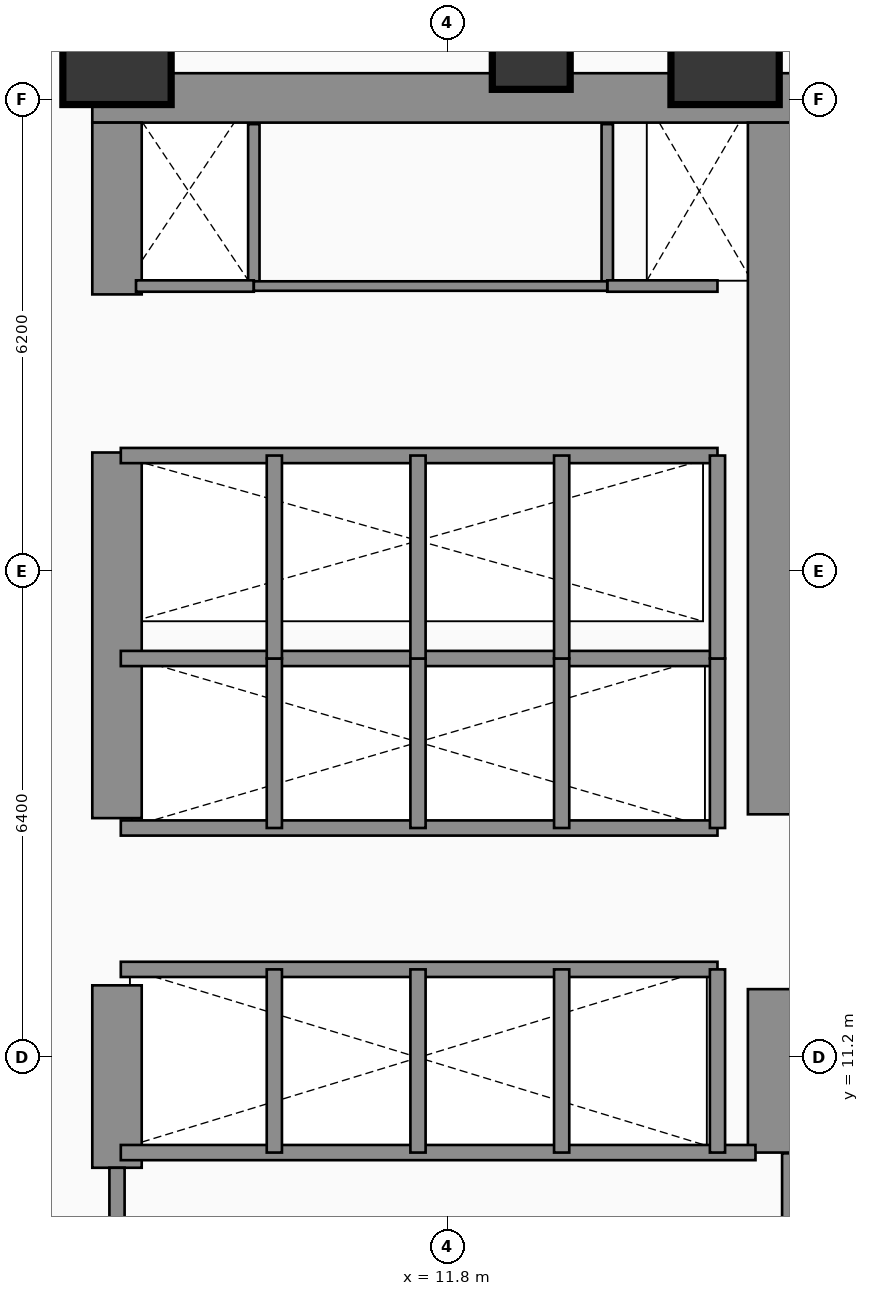
"""IFC4 building model, lengths in metres.
Left out: names, types, materials, properties, quantities, classifications, styles, units other than length and angle.
Written with IfcOpenShell. Run it as: python <this file> out.ifc"""

import sys

from ifc_helpers import new_model, si_unit, direction, frame, frame_2d, origin, origin_2d, place, context, subcontext, project, spatial, rectangle, extrude, element, fill, save


model = new_model("IFC4")
c1 = context("Model", 3, precision=1e-05, world=origin(), true_north=direction((0.0, 1.0)))
c2 = subcontext(c1, "Body", "Model", "MODEL_VIEW")
j1 = project(units=[si_unit("LENGTHUNIT", "METRE"), si_unit("PLANEANGLEUNIT", "RADIAN")], contexts=[c1])
p1 = place(None, origin())
s1 = spatial("IfcSite", under=j1, at=p1, CompositionType="ELEMENT")
p2 = place(p1, origin())
s2 = spatial("IfcBuilding", under=s1, at=p2, CompositionType="ELEMENT")
p3 = place(p2, frame((0.0, 0.0, 110.7)))
s3 = spatial("IfcBuildingStorey", under=s2, at=p3, CompositionType="ELEMENT", Elevation=110.7)
p4 = place(p3, frame((7.125, 23.825, 0.0), z_axis=(0.0, 0.0, 1.0), x_axis=(1.0, 0.0, 0.0)))
e1 = element("IfcWall", 1, at=p4, inside=s3, PredefinedType="SHEAR", context=c2, shape_type="SweptSolid", body=[
    extrude(rectangle(XDim=14.0, YDim=0.65, at=frame_2d((7.0, 0.0))), origin(), (0.0, 0.0, 1.0), 3.54),
])
p5 = place(p3, frame((7.45, 9.75, 0.0), z_axis=(0.0, 0.0, 1.0), x_axis=(0.0, 1.0, 0.0)))
e2 = element("IfcWall", 2, at=p5, inside=s3, PredefinedType="SHEAR", context=c2, shape_type="SweptSolid", body=[
    extrude(rectangle(XDim=2.4, YDim=0.65, at=frame_2d((1.2, 0.0))), origin(), (0.0, 0.0, 1.0), 3.54),
])
p6 = place(p3, frame((7.45, 14.35, 0.0), z_axis=(0.0, 0.0, 1.0), x_axis=(0.0, 1.0, 0.0)))
e3 = element("IfcWall", 3, at=p6, inside=s3, PredefinedType="SHEAR", context=c2, shape_type="SweptSolid", body=[
    extrude(rectangle(XDim=4.81, YDim=0.65, at=frame_2d((2.405, 0.0))), origin(), (0.0, 0.0, 1.0), 3.54),
])
p7 = place(p3, frame((7.45, 21.24, 0.0), z_axis=(0.0, 0.0, 1.0), x_axis=(0.0, 1.0, 0.0)))
e4 = element("IfcWall", 4, at=p7, inside=s3, PredefinedType="SHEAR", context=c2, shape_type="SweptSolid", body=[
    extrude(rectangle(XDim=2.26, YDim=0.65, at=frame_2d((1.13, 0.0))), origin(), (0.0, 0.0, 1.0), 3.54),
])
p8 = place(p3, frame((16.075, 9.95, 0.0), z_axis=(0.0, 0.0, 1.0), x_axis=(0.0, 1.0, 0.0)))
e5 = element("IfcWall", 5, at=p8, inside=s3, PredefinedType="SHEAR", context=c2, shape_type="SweptSolid", body=[
    extrude(rectangle(XDim=2.15, YDim=0.65, at=frame_2d((1.075, 0.0))), origin(), (0.0, 0.0, 1.0), 3.54),
])
p9 = place(p3, frame((16.075, 14.4, 0.0), z_axis=(0.0, 0.0, 1.0), x_axis=(0.0, 1.0, 0.0)))
e6 = element("IfcWall", 6, at=p9, inside=s3, PredefinedType="SHEAR", context=c2, shape_type="SweptSolid", body=[
    extrude(rectangle(XDim=9.1, YDim=0.65, at=frame_2d((4.55, 0.0))), origin(), (0.0, 0.0, 1.0), 3.54),
])
for number, where, z_axis, x_axis in (
    (7, (7.45, 24.45, 0.0), (0.0, 0.0, 1.0), (1.0, 0.0, 0.0)),
    (8, (15.45, 24.45, 0.0), (0.0, 0.0, 1.0), (1.0, 0.0, 0.0)),
):
    element("IfcColumn", number, at=place(p3, frame(where, z_axis=z_axis, x_axis=x_axis)), inside=s3, PredefinedType="COLUMN", context=c2, shape_type="SweptSolid", body=[
        extrude(rectangle(XDim=1.4, YDim=1.4, at=origin_2d()), origin(), (0.0, 0.0, 1.0), 3.54),
    ])
p10 = place(p3, frame((12.9, 24.45, 0.0), z_axis=(0.0, 0.0, 1.0), x_axis=(1.0, 0.0, 0.0)))
e9 = element("IfcColumn", 9, at=p10, inside=s3, PredefinedType="COLUMN", context=c2, shape_type="SweptSolid", body=[
    extrude(rectangle(XDim=1.0, YDim=1.0, at=origin_2d()), origin(), (0.0, 0.0, 1.0), 3.54),
])
p11 = place(p3, frame((16.3, 7.36, 0.0), z_axis=(0.0, 0.0, 1.0), x_axis=(0.0, 1.0, 0.0)))
e10 = element("IfcWall", 10, at=p11, inside=s3, PredefinedType="SHEAR", context=c2, shape_type="SweptSolid", body=[
    extrude(rectangle(XDim=2.58, YDim=0.2, at=frame_2d((1.29, 0.0))), origin(), (0.0, 0.0, 1.0), 3.54),
])
p12 = place(p3, frame((7.5, 9.95, 0.0), z_axis=(0.0, 0.0, 1.0), x_axis=(1.0, 0.0, 0.0)))
e11 = element("IfcWall", 11, at=p12, inside=s3, PredefinedType="PARTITIONING", context=c2, shape_type="SweptSolid", body=[
    extrude(rectangle(XDim=8.35, YDim=0.2, at=frame_2d((4.175, 0.0))), origin(), (0.0, 0.0, 1.0), 3.54),
])
p13 = place(p3, frame((7.45, 7.45, 0.0), z_axis=(0.0, 0.0, 1.0), x_axis=(0.0, 1.0, 0.0)))
e12 = element("IfcWall", 12, at=p13, inside=s3, PredefinedType="PARTITIONING", context=c2, shape_type="SweptSolid", body=[
    extrude(rectangle(XDim=2.3, YDim=0.2, at=frame_2d((1.15, 0.0))), origin(), (0.0, 0.0, 1.0), 2.52),
])
p14 = place(p13, frame((0.633, 0.0, 0.0)))
e13 = element("IfcOpeningElement", 13, at=p14, cuts=e12, PredefinedType="OPENING", context=c2, shape_type="SweptSolid", body=[
    extrude(rectangle(XDim=1.2, YDim=2.25, at=frame_2d((0.6, 1.125))), frame((0.0, 0.11, 0.0), z_axis=(0.0, -1.0, 0.0), x_axis=(1.0, 0.0, 0.0)), (0.0, 0.0, 1.0), 0.22),
])
p15 = place(p3, frame((7.5, 12.36, 0.0), z_axis=(0.0, 0.0, 1.0), x_axis=(1.0, 0.0, 0.0)))
e14 = element("IfcWall", 14, at=p15, inside=s3, PredefinedType="PARTITIONING", context=c2, shape_type="SweptSolid", body=[
    extrude(rectangle(XDim=7.85, YDim=0.2, at=frame_2d((3.925, 0.0))), origin(), (0.0, 0.0, 1.0), 3.54),
])
p16 = place(p15, frame((0.53, 0.0, 0.0)))
e15 = element("IfcOpeningElement", 15, at=p16, cuts=e14, PredefinedType="OPENING", context=c2, shape_type="SweptSolid", body=[
    extrude(rectangle(XDim=1.1, YDim=2.2, at=frame_2d((0.55, 1.1))), frame((0.0, 0.11, 0.0), z_axis=(0.0, -1.0, 0.0), x_axis=(1.0, 0.0, 0.0)), (0.0, 0.0, 1.0), 0.22),
])
p17 = place(p15, frame((2.42, 0.0, 0.0)))
e16 = element("IfcOpeningElement", 16, at=p17, cuts=e14, PredefinedType="OPENING", context=c2, shape_type="SweptSolid", body=[
    extrude(rectangle(XDim=1.1, YDim=2.2, at=frame_2d((0.55, 1.1))), frame((0.0, 0.11, 0.0), z_axis=(0.0, -1.0, 0.0), x_axis=(1.0, 0.0, 0.0)), (0.0, 0.0, 1.0), 0.22),
])
p18 = place(p15, frame((4.31, 0.0, 0.0)))
e17 = element("IfcOpeningElement", 17, at=p18, cuts=e14, PredefinedType="OPENING", context=c2, shape_type="SweptSolid", body=[
    extrude(rectangle(XDim=1.1, YDim=2.2, at=frame_2d((0.55, 1.1))), frame((0.0, 0.11, 0.0), z_axis=(0.0, -1.0, 0.0), x_axis=(1.0, 0.0, 0.0)), (0.0, 0.0, 1.0), 0.22),
])
p19 = place(p15, frame((6.2, 0.0, 0.0)))
e18 = element("IfcOpeningElement", 18, at=p19, cuts=e14, PredefinedType="OPENING", context=c2, shape_type="SweptSolid", body=[
    extrude(rectangle(XDim=1.1, YDim=2.2, at=frame_2d((0.55, 1.1))), frame((0.0, 0.11, 0.0), z_axis=(0.0, -1.0, 0.0), x_axis=(1.0, 0.0, 0.0)), (0.0, 0.0, 1.0), 0.22),
])
for number, where, z_axis, x_axis in (
    (19, (15.35, 9.95, 0.0), (0.0, 0.0, 1.0), (0.0, 1.0, 0.0)),
    (20, (9.52, 9.95, 0.0), (0.0, 0.0, 1.0), (0.0, 1.0, 0.0)),
    (21, (11.41, 9.95, 0.0), (0.0, 0.0, 1.0), (0.0, 1.0, 0.0)),
    (22, (13.3, 9.95, 0.0), (0.0, 0.0, 1.0), (0.0, 1.0, 0.0)),
):
    element("IfcWall", number, at=place(p3, frame(where, z_axis=z_axis, x_axis=x_axis)), inside=s3, PredefinedType="PARTITIONING", context=c2, shape_type="SweptSolid", body=[
        extrude(rectangle(XDim=2.41, YDim=0.2, at=frame_2d((1.205, 0.0))), origin(), (0.0, 0.0, 1.0), 3.54),
    ])
p20 = place(p3, frame((7.5, 14.22, 0.0), z_axis=(0.0, 0.0, 1.0), x_axis=(1.0, 0.0, 0.0)))
e23 = element("IfcWall", 23, at=p20, inside=s3, PredefinedType="PARTITIONING", context=c2, shape_type="SweptSolid", body=[
    extrude(rectangle(XDim=7.85, YDim=0.2, at=frame_2d((3.925, 0.0))), origin(), (0.0, 0.0, 1.0), 3.54),
])
p21 = place(p20, frame((0.53, 0.0, 0.0)))
e24 = element("IfcOpeningElement", 24, at=p21, cuts=e23, PredefinedType="OPENING", context=c2, shape_type="SweptSolid", body=[
    extrude(rectangle(XDim=1.1, YDim=2.2, at=frame_2d((0.55, 1.1))), frame((0.0, 0.11, 0.0), z_axis=(0.0, -1.0, 0.0), x_axis=(1.0, 0.0, 0.0)), (0.0, 0.0, 1.0), 0.22),
])
p22 = place(p20, frame((2.42, 0.0, 0.0)))
e25 = element("IfcOpeningElement", 25, at=p22, cuts=e23, PredefinedType="OPENING", context=c2, shape_type="SweptSolid", body=[
    extrude(rectangle(XDim=1.1, YDim=2.2, at=frame_2d((0.55, 1.1))), frame((0.0, 0.11, 0.0), z_axis=(0.0, -1.0, 0.0), x_axis=(1.0, 0.0, 0.0)), (0.0, 0.0, 1.0), 0.22),
])
p23 = place(p20, frame((4.31, 0.0, 0.0)))
e26 = element("IfcOpeningElement", 26, at=p23, cuts=e23, PredefinedType="OPENING", context=c2, shape_type="SweptSolid", body=[
    extrude(rectangle(XDim=1.1, YDim=2.2, at=frame_2d((0.55, 1.1))), frame((0.0, 0.11, 0.0), z_axis=(0.0, -1.0, 0.0), x_axis=(1.0, 0.0, 0.0)), (0.0, 0.0, 1.0), 0.22),
])
p24 = place(p20, frame((6.2, 0.0, 0.0)))
e27 = element("IfcOpeningElement", 27, at=p24, cuts=e23, PredefinedType="OPENING", context=c2, shape_type="SweptSolid", body=[
    extrude(rectangle(XDim=1.1, YDim=2.2, at=frame_2d((0.55, 1.1))), frame((0.0, 0.11, 0.0), z_axis=(0.0, -1.0, 0.0), x_axis=(1.0, 0.0, 0.0)), (0.0, 0.0, 1.0), 0.22),
])
p25 = place(p3, frame((7.5, 16.45, 0.0), z_axis=(0.0, 0.0, 1.0), x_axis=(1.0, 0.0, 0.0)))
e28 = element("IfcWall", 28, at=p25, inside=s3, PredefinedType="PARTITIONING", context=c2, shape_type="SweptSolid", body=[
    extrude(rectangle(XDim=7.85, YDim=0.2, at=frame_2d((3.925, 0.0))), origin(), (0.0, 0.0, 1.0), 3.54),
])
for number, where, z_axis, x_axis in (
    (29, (15.35, 14.22, 0.0), (0.0, 0.0, 1.0), (0.0, 1.0, 0.0)),
    (30, (9.52, 14.22, 0.0), (0.0, 0.0, 1.0), (0.0, 1.0, 0.0)),
    (31, (11.41, 14.22, 0.0), (0.0, 0.0, 1.0), (0.0, 1.0, 0.0)),
    (32, (13.3, 14.22, 0.0), (0.0, 0.0, 1.0), (0.0, 1.0, 0.0)),
):
    element("IfcWall", number, at=place(p3, frame(where, z_axis=z_axis, x_axis=x_axis)), inside=s3, PredefinedType="PARTITIONING", context=c2, shape_type="SweptSolid", body=[
        extrude(rectangle(XDim=2.23, YDim=0.2, at=frame_2d((1.115, 0.0))), origin(), (0.0, 0.0, 1.0), 3.54),
    ])
p26 = place(p3, frame((7.5, 19.12, 0.0), z_axis=(0.0, 0.0, 1.0), x_axis=(1.0, 0.0, 0.0)))
e33 = element("IfcWall", 33, at=p26, inside=s3, PredefinedType="PARTITIONING", context=c2, shape_type="SweptSolid", body=[
    extrude(rectangle(XDim=7.85, YDim=0.2, at=frame_2d((3.925, 0.0))), origin(), (0.0, 0.0, 1.0), 3.54),
])
p27 = place(p26, frame((0.53, 0.0, 0.0)))
e34 = element("IfcOpeningElement", 34, at=p27, cuts=e33, PredefinedType="OPENING", context=c2, shape_type="SweptSolid", body=[
    extrude(rectangle(XDim=1.1, YDim=2.2, at=frame_2d((0.55, 1.1))), frame((0.0, 0.11, 0.0), z_axis=(0.0, -1.0, 0.0), x_axis=(1.0, 0.0, 0.0)), (0.0, 0.0, 1.0), 0.22),
])
p28 = place(p26, frame((2.42, 0.0, 0.0)))
e35 = element("IfcOpeningElement", 35, at=p28, cuts=e33, PredefinedType="OPENING", context=c2, shape_type="SweptSolid", body=[
    extrude(rectangle(XDim=1.1, YDim=2.2, at=frame_2d((0.55, 1.1))), frame((0.0, 0.11, 0.0), z_axis=(0.0, -1.0, 0.0), x_axis=(1.0, 0.0, 0.0)), (0.0, 0.0, 1.0), 0.22),
])
p29 = place(p26, frame((4.31, 0.0, 0.0)))
e36 = element("IfcOpeningElement", 36, at=p29, cuts=e33, PredefinedType="OPENING", context=c2, shape_type="SweptSolid", body=[
    extrude(rectangle(XDim=1.1, YDim=2.2, at=frame_2d((0.55, 1.1))), frame((0.0, 0.11, 0.0), z_axis=(0.0, -1.0, 0.0), x_axis=(1.0, 0.0, 0.0)), (0.0, 0.0, 1.0), 0.22),
])
p30 = place(p26, frame((6.2, 0.0, 0.0)))
e37 = element("IfcOpeningElement", 37, at=p30, cuts=e33, PredefinedType="OPENING", context=c2, shape_type="SweptSolid", body=[
    extrude(rectangle(XDim=1.1, YDim=2.2, at=frame_2d((0.55, 1.1))), frame((0.0, 0.11, 0.0), z_axis=(0.0, -1.0, 0.0), x_axis=(1.0, 0.0, 0.0)), (0.0, 0.0, 1.0), 0.22),
])
for number, where, z_axis, x_axis in (
    (38, (15.35, 16.45, 0.0), (0.0, 0.0, 1.0), (0.0, 1.0, 0.0)),
    (39, (9.52, 16.45, 0.0), (0.0, 0.0, 1.0), (0.0, 1.0, 0.0)),
    (40, (11.41, 16.45, 0.0), (0.0, 0.0, 1.0), (0.0, 1.0, 0.0)),
    (41, (13.3, 16.45, 0.0), (0.0, 0.0, 1.0), (0.0, 1.0, 0.0)),
):
    element("IfcWall", number, at=place(p3, frame(where, z_axis=z_axis, x_axis=x_axis)), inside=s3, PredefinedType="PARTITIONING", context=c2, shape_type="SweptSolid", body=[
        extrude(rectangle(XDim=2.67, YDim=0.2, at=frame_2d((1.335, 0.0))), origin(), (0.0, 0.0, 1.0), 3.54),
    ])
for number, where, z_axis, x_axis in (
    (42, (9.25, 21.35, 0.0), (0.0, 0.0, 1.0), (0.0, 1.0, 0.0)),
    (43, (13.9, 21.35, 0.0), (0.0, 0.0, 1.0), (0.0, 1.0, 0.0)),
):
    element("IfcWall", number, at=place(p3, frame(where, z_axis=z_axis, x_axis=x_axis)), inside=s3, PredefinedType="PARTITIONING", context=c2, shape_type="SweptSolid", body=[
        extrude(rectangle(XDim=2.13, YDim=0.15, at=frame_2d((1.065, 0.0))), origin(), (0.0, 0.0, 1.0), 3.54),
    ])
p31 = place(p3, frame((7.7, 21.35, 0.0), z_axis=(0.0, 0.0, 1.0), x_axis=(1.0, 0.0, 0.0)))
e44 = element("IfcWall", 44, at=p31, inside=s3, PredefinedType="PARTITIONING", context=c2, shape_type="SweptSolid", body=[
    extrude(rectangle(XDim=1.55, YDim=0.15, at=frame_2d((0.775, 0.0))), origin(), (0.0, 0.0, 1.0), 3.54),
])
p32 = place(p31, frame((0.39, 0.0, 0.0)))
e45 = element("IfcOpeningElement", 45, at=p32, cuts=e44, PredefinedType="OPENING", context=c2, shape_type="SweptSolid", body=[
    extrude(rectangle(XDim=0.85, YDim=2.15, at=frame_2d((0.425, 1.075))), frame((0.0, 0.085, 0.0), z_axis=(0.0, -1.0, 0.0), x_axis=(1.0, 0.0, 0.0)), (0.0, 0.0, 1.0), 0.17),
])
p33 = place(p3, frame((13.9, 21.35, 0.0), z_axis=(0.0, 0.0, 1.0), x_axis=(1.0, 0.0, 0.0)))
e46 = element("IfcWall", 46, at=p33, inside=s3, PredefinedType="PARTITIONING", context=c2, shape_type="SweptSolid", body=[
    extrude(rectangle(XDim=1.45, YDim=0.15, at=frame_2d((0.725, 0.0))), origin(), (0.0, 0.0, 1.0), 3.54),
])
p34 = place(p3, frame((9.25, 21.35, 0.0), z_axis=(0.0, 0.0, 1.0), x_axis=(1.0, 0.0, 0.0)))
e47 = element("IfcWall", 47, at=p34, inside=s3, PredefinedType="PARTITIONING", context=c2, shape_type="SweptSolid", body=[
    extrude(rectangle(XDim=4.65, YDim=0.125, at=frame_2d((2.325, 0.0))), origin(), (0.0, 0.0, 1.0), 3.54),
])
p35 = place(p34, frame((1.971, 0.0, 0.0)))
e48 = element("IfcOpeningElement", 48, at=p35, cuts=e47, PredefinedType="OPENING", context=c2, shape_type="SweptSolid", body=[
    extrude(rectangle(XDim=0.85, YDim=2.15, at=frame_2d((0.425, 1.075))), frame((0.0, 0.073, 0.0), z_axis=(0.0, -1.0, 0.0), x_axis=(1.0, 0.0, 0.0)), (0.0, 0.0, 1.0), 0.145),
])
p36 = place(p14, frame((1.2, 0.0, 0.0), z_axis=(0.0, 0.0, 1.0), x_axis=(-1.0, 0.0, 0.0)))
e49 = element("IfcDoor", 49, at=p36, inside=s3, OperationType="SINGLE_SWING_LEFT", PredefinedType="DOOR", context=c2, shape_type="SweptSolid", body=[
    extrude(rectangle(XDim=1.2, YDim=2.25, at=frame_2d((0.6, 1.125))), frame((0.0, 0.025, 0.0), z_axis=(0.0, -1.0, 0.0), x_axis=(1.0, 0.0, 0.0)), (0.0, 0.0, 1.0), 0.05),
])
fill(e13, e49)
p37 = place(p16, origin())
e50 = element("IfcDoor", 50, at=p37, inside=s3, OperationType="SLIDING_TO_LEFT", PredefinedType="DOOR", context=c2, shape_type="SweptSolid", body=[
    extrude(rectangle(XDim=1.1, YDim=2.2, at=frame_2d((0.55, 1.1))), frame((0.0, 0.025, 0.0), z_axis=(0.0, -1.0, 0.0), x_axis=(1.0, 0.0, 0.0)), (0.0, 0.0, 1.0), 0.05),
])
fill(e15, e50)
p38 = place(p17, origin())
e51 = element("IfcDoor", 51, at=p38, inside=s3, OperationType="SLIDING_TO_LEFT", PredefinedType="DOOR", context=c2, shape_type="SweptSolid", body=[
    extrude(rectangle(XDim=1.1, YDim=2.2, at=frame_2d((0.55, 1.1))), frame((0.0, 0.025, 0.0), z_axis=(0.0, -1.0, 0.0), x_axis=(1.0, 0.0, 0.0)), (0.0, 0.0, 1.0), 0.05),
])
fill(e16, e51)
p39 = place(p18, origin())
e52 = element("IfcDoor", 52, at=p39, inside=s3, OperationType="SLIDING_TO_LEFT", PredefinedType="DOOR", context=c2, shape_type="SweptSolid", body=[
    extrude(rectangle(XDim=1.1, YDim=2.2, at=frame_2d((0.55, 1.1))), frame((0.0, 0.025, 0.0), z_axis=(0.0, -1.0, 0.0), x_axis=(1.0, 0.0, 0.0)), (0.0, 0.0, 1.0), 0.05),
])
fill(e17, e52)
p40 = place(p19, origin())
e53 = element("IfcDoor", 53, at=p40, inside=s3, OperationType="SLIDING_TO_LEFT", PredefinedType="DOOR", context=c2, shape_type="SweptSolid", body=[
    extrude(rectangle(XDim=1.1, YDim=2.2, at=frame_2d((0.55, 1.1))), frame((0.0, 0.025, 0.0), z_axis=(0.0, -1.0, 0.0), x_axis=(1.0, 0.0, 0.0)), (0.0, 0.0, 1.0), 0.05),
])
fill(e18, e53)
p41 = place(p21, frame((1.1, 0.0, 0.0), z_axis=(0.0, 0.0, 1.0), x_axis=(-1.0, 0.0, 0.0)))
e54 = element("IfcDoor", 54, at=p41, inside=s3, OperationType="SLIDING_TO_LEFT", PredefinedType="DOOR", context=c2, shape_type="SweptSolid", body=[
    extrude(rectangle(XDim=1.1, YDim=2.2, at=frame_2d((0.55, 1.1))), frame((0.0, 0.025, 0.0), z_axis=(0.0, -1.0, 0.0), x_axis=(1.0, 0.0, 0.0)), (0.0, 0.0, 1.0), 0.05),
])
fill(e24, e54)
p42 = place(p22, frame((1.1, 0.0, 0.0), z_axis=(0.0, 0.0, 1.0), x_axis=(-1.0, 0.0, 0.0)))
e55 = element("IfcDoor", 55, at=p42, inside=s3, OperationType="SLIDING_TO_LEFT", PredefinedType="DOOR", context=c2, shape_type="SweptSolid", body=[
    extrude(rectangle(XDim=1.1, YDim=2.2, at=frame_2d((0.55, 1.1))), frame((0.0, 0.025, 0.0), z_axis=(0.0, -1.0, 0.0), x_axis=(1.0, 0.0, 0.0)), (0.0, 0.0, 1.0), 0.05),
])
fill(e25, e55)
p43 = place(p23, frame((1.1, 0.0, 0.0), z_axis=(0.0, 0.0, 1.0), x_axis=(-1.0, 0.0, 0.0)))
e56 = element("IfcDoor", 56, at=p43, inside=s3, OperationType="SLIDING_TO_LEFT", PredefinedType="DOOR", context=c2, shape_type="SweptSolid", body=[
    extrude(rectangle(XDim=1.1, YDim=2.2, at=frame_2d((0.55, 1.1))), frame((0.0, 0.025, 0.0), z_axis=(0.0, -1.0, 0.0), x_axis=(1.0, 0.0, 0.0)), (0.0, 0.0, 1.0), 0.05),
])
fill(e26, e56)
p44 = place(p24, frame((1.1, 0.0, 0.0), z_axis=(0.0, 0.0, 1.0), x_axis=(-1.0, 0.0, 0.0)))
e57 = element("IfcDoor", 57, at=p44, inside=s3, OperationType="SLIDING_TO_LEFT", PredefinedType="DOOR", context=c2, shape_type="SweptSolid", body=[
    extrude(rectangle(XDim=1.1, YDim=2.2, at=frame_2d((0.55, 1.1))), frame((0.0, 0.025, 0.0), z_axis=(0.0, -1.0, 0.0), x_axis=(1.0, 0.0, 0.0)), (0.0, 0.0, 1.0), 0.05),
])
fill(e27, e57)
p45 = place(p27, origin())
e58 = element("IfcDoor", 58, at=p45, inside=s3, OperationType="SLIDING_TO_LEFT", PredefinedType="DOOR", context=c2, shape_type="SweptSolid", body=[
    extrude(rectangle(XDim=1.1, YDim=2.2, at=frame_2d((0.55, 1.1))), frame((0.0, 0.025, 0.0), z_axis=(0.0, -1.0, 0.0), x_axis=(1.0, 0.0, 0.0)), (0.0, 0.0, 1.0), 0.05),
])
fill(e34, e58)
p46 = place(p28, origin())
e59 = element("IfcDoor", 59, at=p46, inside=s3, OperationType="SLIDING_TO_LEFT", PredefinedType="DOOR", context=c2, shape_type="SweptSolid", body=[
    extrude(rectangle(XDim=1.1, YDim=2.2, at=frame_2d((0.55, 1.1))), frame((0.0, 0.025, 0.0), z_axis=(0.0, -1.0, 0.0), x_axis=(1.0, 0.0, 0.0)), (0.0, 0.0, 1.0), 0.05),
])
fill(e35, e59)
p47 = place(p29, origin())
e60 = element("IfcDoor", 60, at=p47, inside=s3, OperationType="SLIDING_TO_LEFT", PredefinedType="DOOR", context=c2, shape_type="SweptSolid", body=[
    extrude(rectangle(XDim=1.1, YDim=2.2, at=frame_2d((0.55, 1.1))), frame((0.0, 0.025, 0.0), z_axis=(0.0, -1.0, 0.0), x_axis=(1.0, 0.0, 0.0)), (0.0, 0.0, 1.0), 0.05),
])
fill(e36, e60)
p48 = place(p30, origin())
e61 = element("IfcDoor", 61, at=p48, inside=s3, OperationType="SLIDING_TO_LEFT", PredefinedType="DOOR", context=c2, shape_type="SweptSolid", body=[
    extrude(rectangle(XDim=1.1, YDim=2.2, at=frame_2d((0.55, 1.1))), frame((0.0, 0.025, 0.0), z_axis=(0.0, -1.0, 0.0), x_axis=(1.0, 0.0, 0.0)), (0.0, 0.0, 1.0), 0.05),
])
fill(e37, e61)
p49 = place(p32, origin())
e62 = element("IfcDoor", 62, at=p49, inside=s3, OperationType="SINGLE_SWING_RIGHT", PredefinedType="DOOR", context=c2, shape_type="SweptSolid", body=[
    extrude(rectangle(XDim=0.85, YDim=2.15, at=frame_2d((0.425, 1.075))), frame((0.0, 0.025, 0.0), z_axis=(0.0, -1.0, 0.0), x_axis=(1.0, 0.0, 0.0)), (0.0, 0.0, 1.0), 0.05),
])
fill(e45, e62)
p50 = place(p35, origin())
e63 = element("IfcDoor", 63, at=p50, inside=s3, OperationType="SINGLE_SWING_LEFT", PredefinedType="DOOR", context=c2, shape_type="SweptSolid", body=[
    extrude(rectangle(XDim=0.85, YDim=2.15, at=frame_2d((0.425, 1.075))), frame((0.0, 0.025, 0.0), z_axis=(0.0, -1.0, 0.0), x_axis=(1.0, 0.0, 0.0)), (0.0, 0.0, 1.0), 0.05),
])
fill(e48, e63)
save(model, sys.argv[1])
